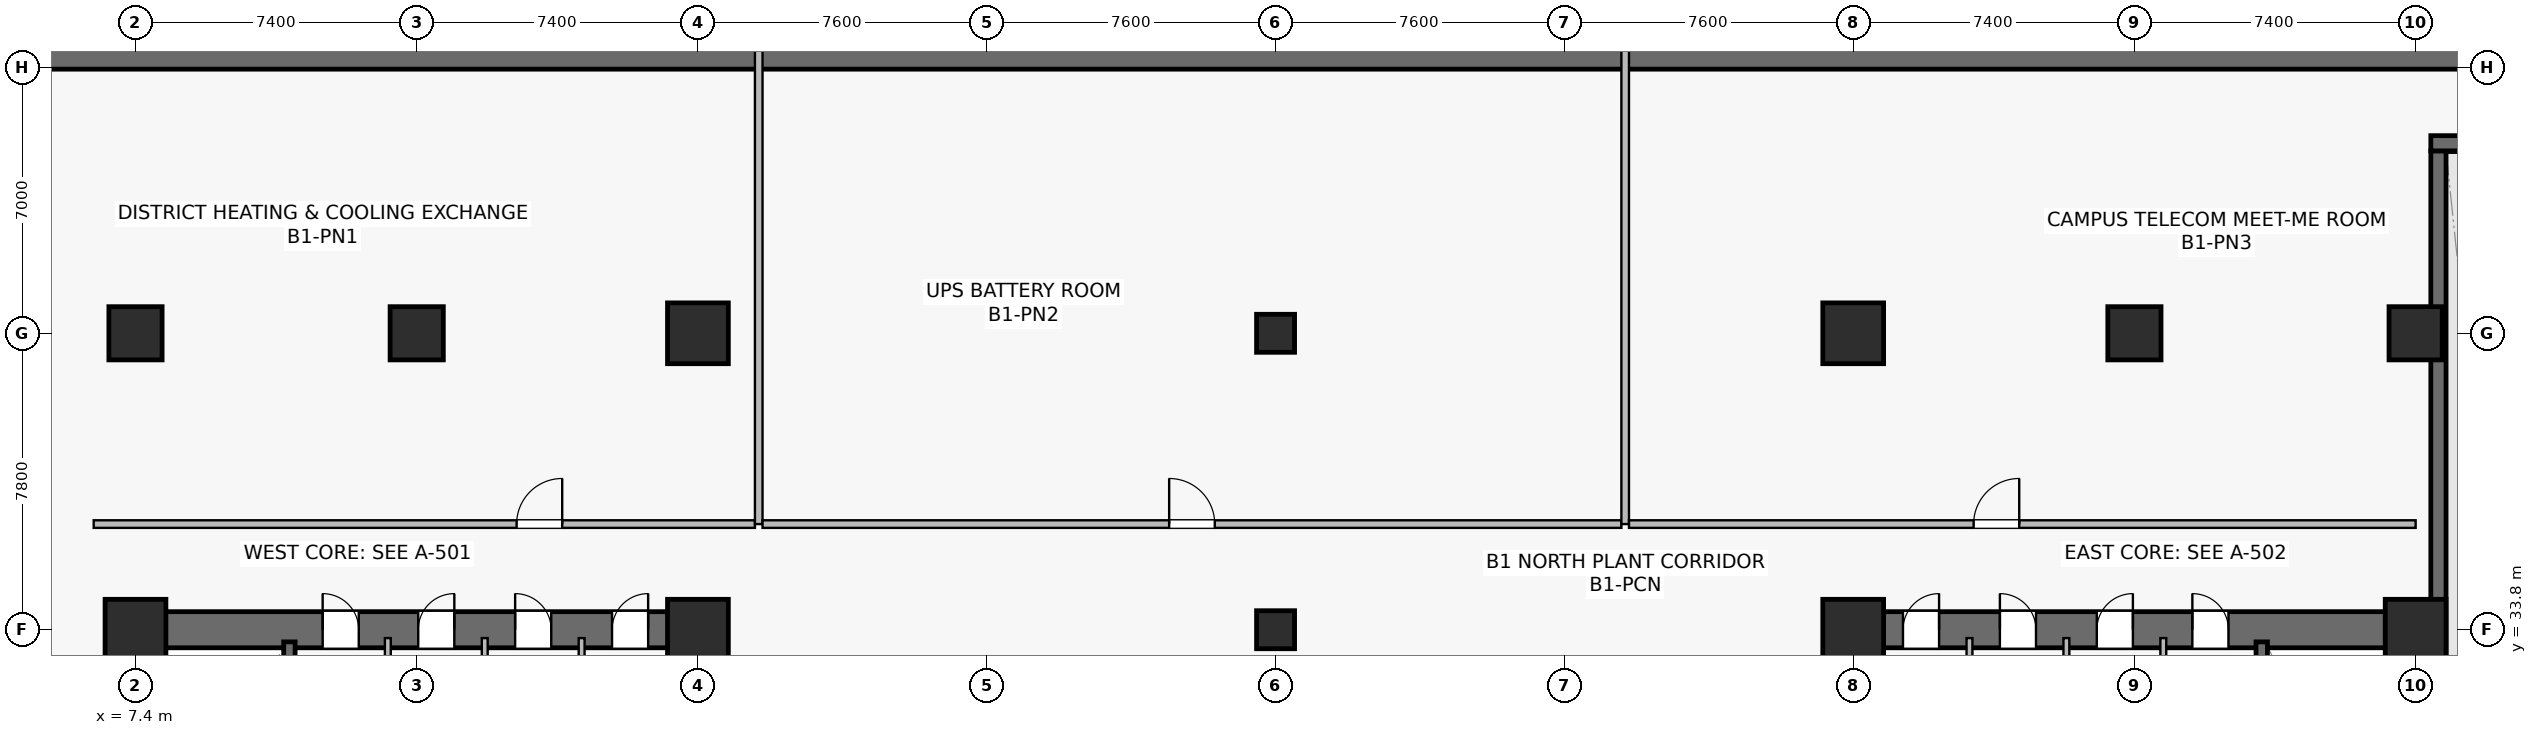
"""IFC4 building model, lengths in metres.
Left out: names, types, materials, properties, quantities, classifications, styles, units other than length and angle.
Written with IfcOpenShell. Run it as: python <this file> out.ifc"""

import sys

from ifc_helpers import new_model, si_unit, direction, frame, frame_2d, origin, origin_2d, place, context, subcontext, project, spatial, rectangle, extrude, source, transform, mapped, element, fill, save


model = new_model("IFC4")
c1 = context("Model", 3, precision=1e-05, world=origin(), true_north=direction((0.0, 1.0)))
c2 = subcontext(c1, "Body", "Model", "MODEL_VIEW")
j1 = project(units=[si_unit("LENGTHUNIT", "METRE"), si_unit("PLANEANGLEUNIT", "RADIAN")], contexts=[c1])
p1 = place(None, origin())
s1 = spatial("IfcSite", under=j1, at=p1, CompositionType="ELEMENT")
p2 = place(p1, origin())
s2 = spatial("IfcBuilding", under=s1, at=p2, CompositionType="ELEMENT")
p3 = place(p2, frame((0.0, 0.0, -4.8)))
s3 = spatial("IfcBuildingStorey", under=s2, at=p3, CompositionType="ELEMENT", Elevation=-4.8)
p4 = place(p3, frame((6.925, 33.8, 0.0), z_axis=(0.0, 0.0, 1.0), x_axis=(1.0, 0.0, 0.0)))
e1 = element("IfcWall", 1, at=p4, inside=s3, PredefinedType="SHEAR", context=c2, shape_type="SweptSolid", body=[
    extrude(rectangle(XDim=15.75, YDim=0.95, at=frame_2d((7.875, 0.0))), origin(), (0.0, 0.0, 1.0), 4.45),
])
p5 = place(p4, frame((5.4, 0.0, 0.0)))
e2 = element("IfcOpeningElement", 2, at=p5, cuts=e1, PredefinedType="OPENING", context=c2, shape_type="SweptSolid", body=[
    extrude(rectangle(XDim=0.95, YDim=2.15, at=frame_2d((0.475, 1.075))), frame((0.0, 0.485, 0.0), z_axis=(0.0, -1.0, 0.0), x_axis=(1.0, 0.0, 0.0)), (0.0, 0.0, 1.0), 0.97),
])
p6 = place(p4, frame((7.915, 0.0, 0.0)))
e3 = element("IfcOpeningElement", 3, at=p6, cuts=e1, PredefinedType="OPENING", context=c2, shape_type="SweptSolid", body=[
    extrude(rectangle(XDim=0.95, YDim=2.15, at=frame_2d((0.475, 1.075))), frame((0.0, 0.485, 0.0), z_axis=(0.0, -1.0, 0.0), x_axis=(1.0, 0.0, 0.0)), (0.0, 0.0, 1.0), 0.97),
])
p7 = place(p4, frame((10.465, 0.0, 0.0)))
e4 = element("IfcOpeningElement", 4, at=p7, cuts=e1, PredefinedType="OPENING", context=c2, shape_type="SweptSolid", body=[
    extrude(rectangle(XDim=0.95, YDim=2.15, at=frame_2d((0.475, 1.075))), frame((0.0, 0.485, 0.0), z_axis=(0.0, -1.0, 0.0), x_axis=(1.0, 0.0, 0.0)), (0.0, 0.0, 1.0), 0.97),
])
p8 = place(p4, frame((13.015, 0.0, 0.0)))
e5 = element("IfcOpeningElement", 5, at=p8, cuts=e1, PredefinedType="OPENING", context=c2, shape_type="SweptSolid", body=[
    extrude(rectangle(XDim=0.95, YDim=2.15, at=frame_2d((0.475, 1.075))), frame((0.0, 0.485, 0.0), z_axis=(0.0, -1.0, 0.0), x_axis=(1.0, 0.0, 0.0)), (0.0, 0.0, 1.0), 0.97),
])
p9 = place(p3, frame((7.4, 15.275, 0.0), z_axis=(0.0, 0.0, 1.0), x_axis=(0.0, 1.0, 0.0)))
e6 = element("IfcWall", 6, at=p9, inside=s3, PredefinedType="SHEAR", context=c2, shape_type="SweptSolid", body=[
    extrude(rectangle(XDim=18.05, YDim=0.95, at=frame_2d((9.025, 0.0))), origin(), (0.0, 0.0, 1.0), 4.45),
])
p10 = place(p3, frame((22.2, 15.275, 0.0), z_axis=(0.0, 0.0, 1.0), x_axis=(0.0, 1.0, 0.0)))
e7 = element("IfcWall", 7, at=p10, inside=s3, PredefinedType="SHEAR", context=c2, shape_type="SweptSolid", body=[
    extrude(rectangle(XDim=18.05, YDim=0.95, at=frame_2d((9.025, 0.0))), origin(), (0.0, 0.0, 1.0), 4.45),
])
p11 = place(p10, frame((3.275, 0.0, 0.0)))
e8 = element("IfcOpeningElement", 8, at=p11, cuts=e7, PredefinedType="OPENING", context=c2, shape_type="SweptSolid", body=[
    extrude(rectangle(XDim=1.42, YDim=2.2, at=frame_2d((0.71, 1.1))), frame((0.0, 0.485, 0.0), z_axis=(0.0, -1.0, 0.0), x_axis=(1.0, 0.0, 0.0)), (0.0, 0.0, 1.0), 0.97),
])
p12 = place(p3, frame((11.45, 24.85, 0.0), z_axis=(0.0, 0.0, 1.0), x_axis=(0.0, 1.0, 0.0)))
e9 = element("IfcWall", 9, at=p12, inside=s3, PredefinedType="SHEAR", context=c2, shape_type="SweptSolid", body=[
    extrude(rectangle(XDim=8.63, YDim=0.3, at=frame_2d((4.315, 0.0))), origin(), (0.0, 0.0, 1.0), 4.45),
])
p13 = place(p12, frame((0.42, 0.0, 0.0)))
e10 = element("IfcOpeningElement", 10, at=p13, cuts=e9, PredefinedType="OPENING", context=c2, shape_type="SweptSolid", body=[
    extrude(rectangle(XDim=1.1, YDim=2.15, at=frame_2d((0.55, 1.075))), frame((0.0, 0.16, 0.0), z_axis=(0.0, -1.0, 0.0), x_axis=(1.0, 0.0, 0.0)), (0.0, 0.0, 1.0), 0.32),
])
p14 = place(p3, frame((52.125, 33.8, 0.0), z_axis=(0.0, 0.0, 1.0), x_axis=(1.0, 0.0, 0.0)))
e11 = element("IfcWall", 11, at=p14, inside=s3, PredefinedType="SHEAR", context=c2, shape_type="SweptSolid", body=[
    extrude(rectangle(XDim=15.75, YDim=0.95, at=frame_2d((7.875, 0.0))), origin(), (0.0, 0.0, 1.0), 4.45),
])
p15 = place(p14, frame((9.4, 0.0, 0.0)))
e12 = element("IfcOpeningElement", 12, at=p15, cuts=e11, PredefinedType="OPENING", context=c2, shape_type="SweptSolid", body=[
    extrude(rectangle(XDim=0.95, YDim=2.15, at=frame_2d((0.475, 1.075))), frame((0.0, 0.485, 0.0), z_axis=(0.0, -1.0, 0.0), x_axis=(1.0, 0.0, 0.0)), (0.0, 0.0, 1.0), 0.97),
])
p16 = place(p14, frame((6.885, 0.0, 0.0)))
e13 = element("IfcOpeningElement", 13, at=p16, cuts=e11, PredefinedType="OPENING", context=c2, shape_type="SweptSolid", body=[
    extrude(rectangle(XDim=0.95, YDim=2.15, at=frame_2d((0.475, 1.075))), frame((0.0, 0.485, 0.0), z_axis=(0.0, -1.0, 0.0), x_axis=(1.0, 0.0, 0.0)), (0.0, 0.0, 1.0), 0.97),
])
p17 = place(p14, frame((4.335, 0.0, 0.0)))
e14 = element("IfcOpeningElement", 14, at=p17, cuts=e11, PredefinedType="OPENING", context=c2, shape_type="SweptSolid", body=[
    extrude(rectangle(XDim=0.95, YDim=2.15, at=frame_2d((0.475, 1.075))), frame((0.0, 0.485, 0.0), z_axis=(0.0, -1.0, 0.0), x_axis=(1.0, 0.0, 0.0)), (0.0, 0.0, 1.0), 0.97),
])
p18 = place(p14, frame((1.785, 0.0, 0.0)))
e15 = element("IfcOpeningElement", 15, at=p18, cuts=e11, PredefinedType="OPENING", context=c2, shape_type="SweptSolid", body=[
    extrude(rectangle(XDim=0.95, YDim=2.15, at=frame_2d((0.475, 1.075))), frame((0.0, 0.485, 0.0), z_axis=(0.0, -1.0, 0.0), x_axis=(1.0, 0.0, 0.0)), (0.0, 0.0, 1.0), 0.97),
])
p19 = place(p3, frame((52.6, 15.275, 0.0), z_axis=(0.0, 0.0, 1.0), x_axis=(0.0, 1.0, 0.0)))
e16 = element("IfcWall", 16, at=p19, inside=s3, PredefinedType="SHEAR", context=c2, shape_type="SweptSolid", body=[
    extrude(rectangle(XDim=18.05, YDim=0.95, at=frame_2d((9.025, 0.0))), origin(), (0.0, 0.0, 1.0), 4.45),
])
p20 = place(p19, frame((3.275, 0.0, 0.0)))
e17 = element("IfcOpeningElement", 17, at=p20, cuts=e16, PredefinedType="OPENING", context=c2, shape_type="SweptSolid", body=[
    extrude(rectangle(XDim=1.42, YDim=2.2, at=frame_2d((0.71, 1.1))), frame((0.0, 0.485, 0.0), z_axis=(0.0, -1.0, 0.0), x_axis=(1.0, 0.0, 0.0)), (0.0, 0.0, 1.0), 0.97),
])
p21 = place(p3, frame((67.4, 15.275, 0.0), z_axis=(0.0, 0.0, 1.0), x_axis=(0.0, 1.0, 0.0)))
e18 = element("IfcWall", 18, at=p21, inside=s3, PredefinedType="SHEAR", context=c2, shape_type="SweptSolid", body=[
    extrude(rectangle(XDim=18.05, YDim=0.95, at=frame_2d((9.025, 0.0))), origin(), (0.0, 0.0, 1.0), 4.45),
])
p22 = place(p3, frame((63.35, 24.85, 0.0), z_axis=(0.0, 0.0, 1.0), x_axis=(0.0, 1.0, 0.0)))
e19 = element("IfcWall", 19, at=p22, inside=s3, PredefinedType="SHEAR", context=c2, shape_type="SweptSolid", body=[
    extrude(rectangle(XDim=8.63, YDim=0.3, at=frame_2d((4.315, 0.0))), origin(), (0.0, 0.0, 1.0), 4.45),
])
p23 = place(p22, frame((0.42, 0.0, 0.0)))
e20 = element("IfcOpeningElement", 20, at=p23, cuts=e19, PredefinedType="OPENING", context=c2, shape_type="SweptSolid", body=[
    extrude(rectangle(XDim=1.1, YDim=2.15, at=frame_2d((0.55, 1.075))), frame((0.0, 0.16, 0.0), z_axis=(0.0, -1.0, 0.0), x_axis=(1.0, 0.0, 0.0)), (0.0, 0.0, 1.0), 0.32),
])
p24 = place(p3, frame((-1.0, 48.975, 0.0), z_axis=(0.0, 0.0, 1.0), x_axis=(1.0, 0.0, 0.0)))
e21 = element("IfcWall", 21, at=p24, inside=s3, PredefinedType="SOLIDWALL", context=c2, shape_type="SweptSolid", body=[
    extrude(rectangle(XDim=76.8, YDim=0.85, at=frame_2d((38.4, 0.0))), origin(), (0.0, 0.0, 1.0), 4.45),
])
p25 = place(p3, frame((68.0, 6.0, 0.0), z_axis=(0.0, 0.0, 1.0), x_axis=(0.0, 1.0, 0.0)))
e22 = element("IfcWall", 22, at=p25, inside=s3, PredefinedType="SHEAR", context=c2, shape_type="SweptSolid", body=[
    extrude(rectangle(XDim=40.4, YDim=0.4, at=frame_2d((20.2, 0.0))), origin(), (0.0, 0.0, 1.0), 4.45),
])
p26 = place(p3, frame((67.8, 46.6, 0.0), z_axis=(0.0, 0.0, 1.0), x_axis=(1.0, 0.0, 0.0)))
e23 = element("IfcWall", 23, at=p26, inside=s3, PredefinedType="SHEAR", context=c2, shape_type="SweptSolid", body=[
    extrude(rectangle(XDim=5.0, YDim=0.4, at=frame_2d((2.5, 0.0))), origin(), (0.0, 0.0, 1.0), 4.45),
])
m1 = source(origin(), c2, "Body", "SweptSolid", [
    extrude(rectangle(XDim=1.6, YDim=1.6, at=origin_2d()), origin(), (0.0, 0.0, 1.0), 4.8),
])
for number, where, z_axis, x_axis in (
    (24, (7.4, 33.8, 0.0), (0.0, 0.0, 1.0), (1.0, 0.0, 0.0)),
    (25, (22.2, 33.8, 0.0), (0.0, 0.0, 1.0), (1.0, 0.0, 0.0)),
):
    element("IfcColumn", number, at=place(p3, frame(where, z_axis=z_axis, x_axis=x_axis)), inside=s3, PredefinedType="COLUMN", context=c2, shape_type="MappedRepresentation", body=[
        mapped(m1, transform((0.0, 0.0, 0.0), scale=1.0)),
    ])
m2 = source(origin(), c2, "Body", "SweptSolid", [
    extrude(rectangle(XDim=1.4, YDim=1.4, at=origin_2d()), origin(), (0.0, 0.0, 1.0), 4.8),
])
p27 = place(p3, frame((14.8, 41.6, 0.0), z_axis=(0.0, 0.0, 1.0), x_axis=(1.0, 0.0, 0.0)))
e26 = element("IfcColumn", 26, at=p27, inside=s3, PredefinedType="COLUMN", context=c2, shape_type="MappedRepresentation", body=[
    mapped(m2, transform((0.0, 0.0, 0.0), scale=1.0)),
])
for number, where, z_axis, x_axis in (
    (27, (22.2, 41.6, 0.0), (0.0, 0.0, 1.0), (1.0, 0.0, 0.0)),
    (28, (52.6, 33.8, 0.0), (0.0, 0.0, 1.0), (1.0, 0.0, 0.0)),
    (29, (67.4, 33.8, 0.0), (0.0, 0.0, 1.0), (1.0, 0.0, 0.0)),
    (30, (52.6, 41.6, 0.0), (0.0, 0.0, 1.0), (1.0, 0.0, 0.0)),
):
    element("IfcColumn", number, at=place(p3, frame(where, z_axis=z_axis, x_axis=x_axis)), inside=s3, PredefinedType="COLUMN", context=c2, shape_type="MappedRepresentation", body=[
        mapped(m1, transform((0.0, 0.0, 0.0), scale=1.0)),
    ])
for number, where, z_axis, x_axis in (
    (31, (60.0, 41.6, 0.0), (0.0, 0.0, 1.0), (1.0, 0.0, 0.0)),
    (32, (7.4, 41.6, 0.0), (0.0, 0.0, 1.0), (1.0, 0.0, 0.0)),
    (33, (67.4, 41.6, 0.0), (0.0, 0.0, 1.0), (1.0, 0.0, 0.0)),
):
    element("IfcColumn", number, at=place(p3, frame(where, z_axis=z_axis, x_axis=x_axis)), inside=s3, PredefinedType="COLUMN", context=c2, shape_type="MappedRepresentation", body=[
        mapped(m2, transform((0.0, 0.0, 0.0), scale=1.0)),
    ])
m3 = source(origin(), c2, "Body", "SweptSolid", [
    extrude(rectangle(XDim=1.0, YDim=1.0, at=origin_2d()), origin(), (0.0, 0.0, 1.0), 4.8),
])
for number, where, z_axis, x_axis in (
    (34, (37.4, 33.8, 0.0), (0.0, 0.0, 1.0), (1.0, 0.0, 0.0)),
    (35, (37.4, 41.6, 0.0), (0.0, 0.0, 1.0), (1.0, 0.0, 0.0)),
):
    element("IfcColumn", number, at=place(p3, frame(where, z_axis=z_axis, x_axis=x_axis)), inside=s3, PredefinedType="COLUMN", context=c2, shape_type="MappedRepresentation", body=[
        mapped(m3, transform((0.0, 0.0, 0.0), scale=1.0)),
    ])
for number, where, z_axis, x_axis in (
    (36, (14.04, 29.65, 0.0), (0.0, 0.0, 1.0), (0.0, 1.0, 0.0)),
    (37, (16.59, 29.65, 0.0), (0.0, 0.0, 1.0), (0.0, 1.0, 0.0)),
    (38, (19.14, 29.65, 0.0), (0.0, 0.0, 1.0), (0.0, 1.0, 0.0)),
    (39, (60.76, 29.65, 0.0), (0.0, 0.0, 1.0), (0.0, 1.0, 0.0)),
    (40, (58.21, 29.65, 0.0), (0.0, 0.0, 1.0), (0.0, 1.0, 0.0)),
    (41, (55.66, 29.65, 0.0), (0.0, 0.0, 1.0), (0.0, 1.0, 0.0)),
):
    element("IfcWall", number, at=place(p3, frame(where, z_axis=z_axis, x_axis=x_axis)), inside=s3, PredefinedType="PLUMBINGWALL", context=c2, shape_type="SweptSolid", body=[
        extrude(rectangle(XDim=3.93, YDim=0.155, at=frame_2d((1.965, 0.0))), origin(), (0.0, 0.0, 1.0), 4.45),
    ])
p28 = place(p3, frame((6.3, 36.58, 0.0), z_axis=(0.0, 0.0, 1.0), x_axis=(1.0, 0.0, 0.0)))
e42 = element("IfcWall", 42, at=p28, inside=s3, PredefinedType="SOLIDWALL", context=c2, shape_type="SweptSolid", body=[
    extrude(rectangle(XDim=17.4, YDim=0.2, at=frame_2d((8.7, 0.0))), origin(), (0.0, 0.0, 1.0), 3.685),
])
p29 = place(p28, frame((11.129, 0.0, 0.0)))
e43 = element("IfcOpeningElement", 43, at=p29, cuts=e42, PredefinedType="OPENING", context=c2, shape_type="SweptSolid", body=[
    extrude(rectangle(XDim=1.2, YDim=2.16, at=frame_2d((0.6, 1.08))), frame((0.0, 0.11, 0.0), z_axis=(0.0, -1.0, 0.0), x_axis=(1.0, 0.0, 0.0)), (0.0, 0.0, 1.0), 0.22),
])
p30 = place(p3, frame((23.8, 36.58, 0.0), z_axis=(0.0, 0.0, 1.0), x_axis=(0.0, 1.0, 0.0)))
e44 = element("IfcWall", 44, at=p30, inside=s3, PredefinedType="SOLIDWALL", context=c2, shape_type="SweptSolid", body=[
    extrude(rectangle(XDim=12.71, YDim=0.2, at=frame_2d((6.355, 0.0))), origin(), (0.0, 0.0, 1.0), 3.635),
])
p31 = place(p3, frame((23.9, 36.58, 0.0), z_axis=(0.0, 0.0, 1.0), x_axis=(1.0, 0.0, 0.0)))
e45 = element("IfcWall", 45, at=p31, inside=s3, PredefinedType="SOLIDWALL", context=c2, shape_type="SweptSolid", body=[
    extrude(rectangle(XDim=22.6, YDim=0.2, at=frame_2d((11.3, 0.0))), origin(), (0.0, 0.0, 1.0), 3.685),
])
p32 = place(p31, frame((10.7, 0.0, 0.0)))
e46 = element("IfcOpeningElement", 46, at=p32, cuts=e45, PredefinedType="OPENING", context=c2, shape_type="SweptSolid", body=[
    extrude(rectangle(XDim=1.2, YDim=2.16, at=frame_2d((0.6, 1.08))), frame((0.0, 0.11, 0.0), z_axis=(0.0, -1.0, 0.0), x_axis=(1.0, 0.0, 0.0)), (0.0, 0.0, 1.0), 0.22),
])
p33 = place(p3, frame((46.6, 36.58, 0.0), z_axis=(0.0, 0.0, 1.0), x_axis=(0.0, 1.0, 0.0)))
e47 = element("IfcWall", 47, at=p33, inside=s3, PredefinedType="SOLIDWALL", context=c2, shape_type="SweptSolid", body=[
    extrude(rectangle(XDim=12.71, YDim=0.2, at=frame_2d((6.355, 0.0))), origin(), (0.0, 0.0, 1.0), 3.635),
])
p34 = place(p3, frame((46.7, 36.58, 0.0), z_axis=(0.0, 0.0, 1.0), x_axis=(1.0, 0.0, 0.0)))
e48 = element("IfcWall", 48, at=p34, inside=s3, PredefinedType="SOLIDWALL", context=c2, shape_type="SweptSolid", body=[
    extrude(rectangle(XDim=20.7, YDim=0.2, at=frame_2d((10.35, 0.0))), origin(), (0.0, 0.0, 1.0), 3.685),
])
p35 = place(p34, frame((9.069, 0.0, 0.0)))
e49 = element("IfcOpeningElement", 49, at=p35, cuts=e48, PredefinedType="OPENING", context=c2, shape_type="SweptSolid", body=[
    extrude(rectangle(XDim=1.2, YDim=2.16, at=frame_2d((0.6, 1.08))), frame((0.0, 0.11, 0.0), z_axis=(0.0, -1.0, 0.0), x_axis=(1.0, 0.0, 0.0)), (0.0, 0.0, 1.0), 0.22),
])
m4 = source(origin(), c2, "Body", "SweptSolid", [
    extrude(rectangle(XDim=0.95, YDim=2.15, at=frame_2d((0.475, 1.075))), frame((0.0, 0.025, 0.0), z_axis=(0.0, -1.0, 0.0), x_axis=(1.0, 0.0, 0.0)), (0.0, 0.0, 1.0), 0.05),
])
p36 = place(p5, origin())
e50 = element("IfcDoor", 50, at=p36, inside=s3, OperationType="SINGLE_SWING_LEFT", PredefinedType="DOOR", context=c2, shape_type="MappedRepresentation", body=[
    mapped(m4, transform((0.0, 0.0, 0.0), scale=1.0)),
])
fill(e2, e50)
p37 = place(p6, origin())
e51 = element("IfcDoor", 51, at=p37, inside=s3, OperationType="SINGLE_SWING_RIGHT", PredefinedType="DOOR", context=c2, shape_type="MappedRepresentation", body=[
    mapped(m4, transform((0.0, 0.0, 0.0), scale=1.0)),
])
fill(e3, e51)
p38 = place(p7, origin())
e52 = element("IfcDoor", 52, at=p38, inside=s3, OperationType="SINGLE_SWING_LEFT", PredefinedType="DOOR", context=c2, shape_type="MappedRepresentation", body=[
    mapped(m4, transform((0.0, 0.0, 0.0), scale=1.0)),
])
fill(e4, e52)
p39 = place(p8, origin())
e53 = element("IfcDoor", 53, at=p39, inside=s3, OperationType="SINGLE_SWING_RIGHT", PredefinedType="DOOR", context=c2, shape_type="MappedRepresentation", body=[
    mapped(m4, transform((0.0, 0.0, 0.0), scale=1.0)),
])
fill(e5, e53)
p40 = place(p15, origin())
e54 = element("IfcDoor", 54, at=p40, inside=s3, OperationType="SINGLE_SWING_LEFT", PredefinedType="DOOR", context=c2, shape_type="MappedRepresentation", body=[
    mapped(m4, transform((0.0, 0.0, 0.0), scale=1.0)),
])
fill(e12, e54)
p41 = place(p16, origin())
e55 = element("IfcDoor", 55, at=p41, inside=s3, OperationType="SINGLE_SWING_RIGHT", PredefinedType="DOOR", context=c2, shape_type="MappedRepresentation", body=[
    mapped(m4, transform((0.0, 0.0, 0.0), scale=1.0)),
])
fill(e13, e55)
p42 = place(p17, origin())
e56 = element("IfcDoor", 56, at=p42, inside=s3, OperationType="SINGLE_SWING_LEFT", PredefinedType="DOOR", context=c2, shape_type="MappedRepresentation", body=[
    mapped(m4, transform((0.0, 0.0, 0.0), scale=1.0)),
])
fill(e14, e56)
p43 = place(p18, origin())
e57 = element("IfcDoor", 57, at=p43, inside=s3, OperationType="SINGLE_SWING_RIGHT", PredefinedType="DOOR", context=c2, shape_type="MappedRepresentation", body=[
    mapped(m4, transform((0.0, 0.0, 0.0), scale=1.0)),
])
fill(e15, e57)
m5 = source(origin(), c2, "Body", "SweptSolid", [
    extrude(rectangle(XDim=1.2, YDim=2.16, at=frame_2d((0.6, 1.08))), frame((0.0, 0.025, 0.0), z_axis=(0.0, -1.0, 0.0), x_axis=(1.0, 0.0, 0.0)), (0.0, 0.0, 1.0), 0.05),
])
p44 = place(p29, origin())
e58 = element("IfcDoor", 58, at=p44, inside=s3, OperationType="SINGLE_SWING_RIGHT", PredefinedType="DOOR", context=c2, shape_type="MappedRepresentation", body=[
    mapped(m5, transform((0.0, 0.0, 0.0), scale=1.0)),
])
fill(e43, e58)
p45 = place(p32, origin())
e59 = element("IfcDoor", 59, at=p45, inside=s3, OperationType="SINGLE_SWING_LEFT", PredefinedType="DOOR", context=c2, shape_type="MappedRepresentation", body=[
    mapped(m5, transform((0.0, 0.0, 0.0), scale=1.0)),
])
fill(e46, e59)
p46 = place(p35, origin())
e60 = element("IfcDoor", 60, at=p46, inside=s3, OperationType="SINGLE_SWING_RIGHT", PredefinedType="DOOR", context=c2, shape_type="MappedRepresentation", body=[
    mapped(m5, transform((0.0, 0.0, 0.0), scale=1.0)),
])
fill(e49, e60)
save(model, sys.argv[1])
